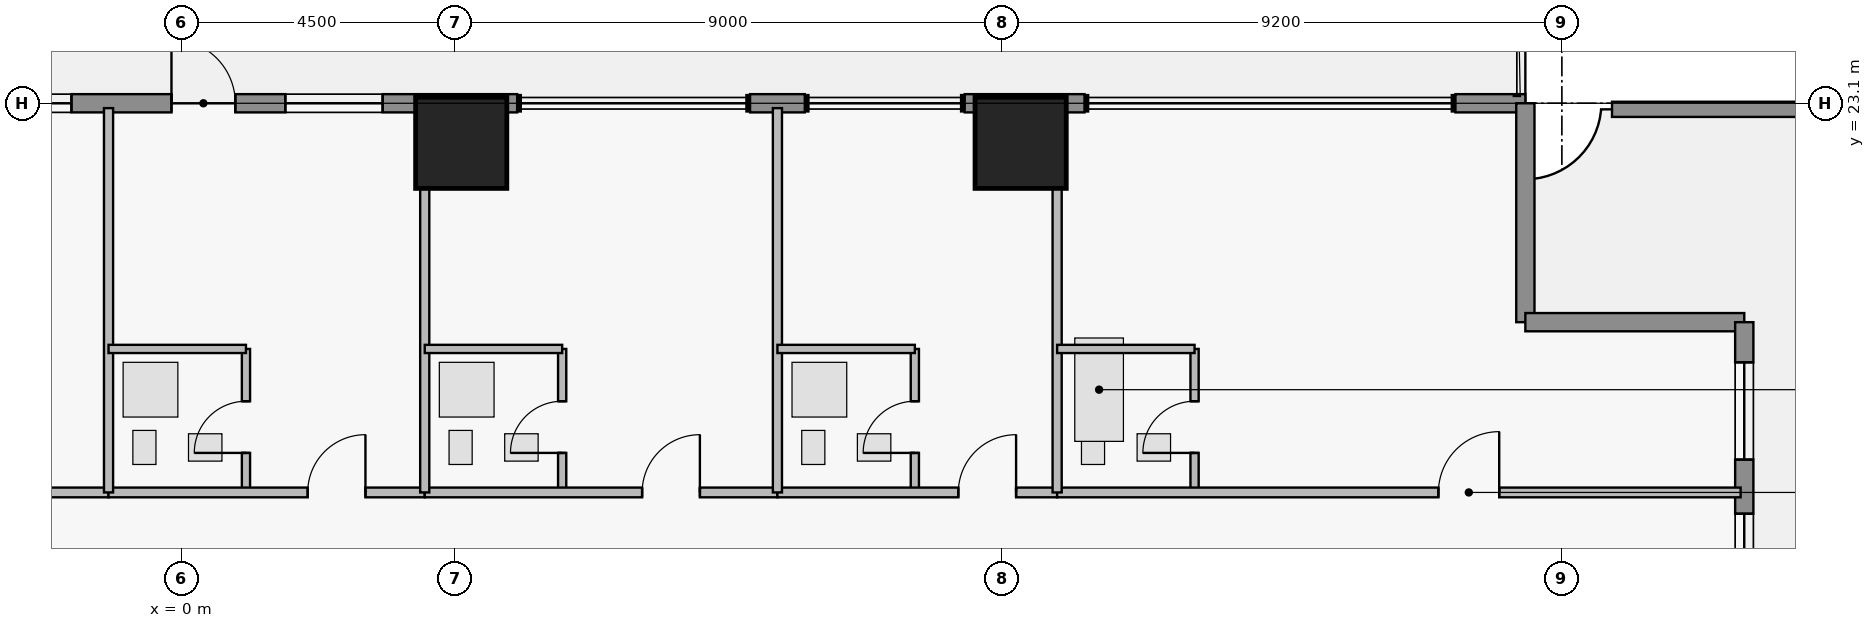
"""IFC4 building model, lengths in metres.
Left out: names, types, materials, properties, quantities, classifications, styles, units other than length and angle.
Written with IfcOpenShell. Run it as: python <this file> out.ifc"""

import sys

from ifc_helpers import new_model, si_unit, direction, frame, frame_2d, origin, origin_2d, place, context, subcontext, project, spatial, rectangle, extrude, element, fill, save


model = new_model("IFC4")
c1 = context("Model", 3, precision=1e-05, world=origin(), true_north=direction((0.0, 1.0)))
c2 = subcontext(c1, "Body", "Model", "MODEL_VIEW")
j1 = project(units=[si_unit("LENGTHUNIT", "METRE"), si_unit("PLANEANGLEUNIT", "RADIAN")], contexts=[c1])
p1 = place(None, origin())
s1 = spatial("IfcSite", under=j1, at=p1, CompositionType="ELEMENT")
p2 = place(p1, origin())
s2 = spatial("IfcBuilding", under=s1, at=p2, CompositionType="ELEMENT")
p3 = place(p2, frame((0.0, 0.0, 27.6)))
s3 = spatial("IfcBuildingStorey", under=s2, at=p3, CompositionType="ELEMENT", Elevation=27.6)
for number, where, z_axis, x_axis in (
    (1, (4.6, 22.45, 0.0), (0.0, 0.0, 1.0), (1.0, 0.0, 0.0)),
    (2, (13.8, 22.45, 0.0), (0.0, 0.0, 1.0), (1.0, 0.0, 0.0)),
):
    element("IfcColumn", number, at=place(p3, frame(where, z_axis=z_axis, x_axis=x_axis)), inside=s3, PredefinedType="COLUMN", context=c2, shape_type="SweptSolid", body=[
        extrude(rectangle(XDim=1.5, YDim=1.5, at=origin_2d()), origin(), (0.0, 0.0, 1.0), 3.65),
    ])
p4 = place(p3, frame((23.525, 23.0, 0.0), z_axis=(0.0, 0.0, 1.0), x_axis=(1.0, 0.0, 0.0)))
e3 = element("IfcWall", 3, at=p4, inside=s3, PredefinedType="PARAPET", context=c2, shape_type="SweptSolid", body=[
    extrude(rectangle(XDim=8.295, YDim=0.25, at=frame_2d((4.147, 0.0))), origin(), (0.0, 0.0, 1.0), 1.15),
])
p5 = place(p3, frame((-14.72, 23.1, 0.0), z_axis=(0.0, 0.0, 1.0), x_axis=(1.0, 0.0, 0.0)))
e4 = element("IfcWall", 4, at=p5, inside=s3, PredefinedType="STANDARD", context=c2, shape_type="SweptSolid", body=[
    extrude(rectangle(XDim=20.24, YDim=0.3, at=frame_2d((10.12, 0.0))), origin(), (0.0, 0.0, 1.0), 3.43),
])
p6 = place(p5, frame((14.555, 0.0, 0.0)))
e5 = element("IfcOpeningElement", 5, at=p6, cuts=e4, PredefinedType="OPENING", context=c2, shape_type="SweptSolid", body=[
    extrude(rectangle(XDim=1.05, YDim=2.2, at=frame_2d((0.525, 1.1))), frame((0.0, 0.16, 0.0), z_axis=(0.0, -1.0, 0.0), x_axis=(1.0, 0.0, 0.0)), (0.0, 0.0, 1.0), 0.32),
])
p7 = place(p5, frame((4.668, 0.0, 0.85)))
e6 = element("IfcOpeningElement", 6, at=p7, cuts=e4, PredefinedType="OPENING", context=c2, shape_type="SweptSolid", body=[
    extrude(rectangle(XDim=1.6, YDim=1.8, at=frame_2d((0.8, 0.9))), frame((0.0, 0.16, 0.0), z_axis=(0.0, -1.0, 0.0), x_axis=(1.0, 0.0, 0.0)), (0.0, 0.0, 1.0), 0.32),
])
p8 = place(p5, frame((2.754, 0.0, 0.95)))
e7 = element("IfcOpeningElement", 7, at=p8, cuts=e4, PredefinedType="OPENING", context=c2, shape_type="SweptSolid", body=[
    extrude(rectangle(XDim=1.15, YDim=1.55, at=frame_2d((0.575, 0.775))), frame((0.0, 0.16, 0.0), z_axis=(0.0, -1.0, 0.0), x_axis=(1.0, 0.0, 0.0)), (0.0, 0.0, 1.0), 0.32),
])
p9 = place(p5, frame((7.955, 0.0, 0.95)))
e8 = element("IfcOpeningElement", 8, at=p9, cuts=e4, PredefinedType="OPENING", context=c2, shape_type="SweptSolid", body=[
    extrude(rectangle(XDim=1.15, YDim=1.55, at=frame_2d((0.575, 0.775))), frame((0.0, 0.16, 0.0), z_axis=(0.0, -1.0, 0.0), x_axis=(1.0, 0.0, 0.0)), (0.0, 0.0, 1.0), 0.32),
])
p10 = place(p5, frame((11.31, 0.0, 0.85)))
e9 = element("IfcOpeningElement", 9, at=p10, cuts=e4, PredefinedType="OPENING", context=c2, shape_type="SweptSolid", body=[
    extrude(rectangle(XDim=1.6, YDim=1.8, at=frame_2d((0.8, 0.9))), frame((0.0, 0.16, 0.0), z_axis=(0.0, -1.0, 0.0), x_axis=(1.0, 0.0, 0.0)), (0.0, 0.0, 1.0), 0.32),
])
p11 = place(p5, frame((16.427, 0.0, 0.85)))
e10 = element("IfcOpeningElement", 10, at=p11, cuts=e4, PredefinedType="OPENING", context=c2, shape_type="SweptSolid", body=[
    extrude(rectangle(XDim=1.6, YDim=1.8, at=frame_2d((0.8, 0.9))), frame((0.0, 0.16, 0.0), z_axis=(0.0, -1.0, 0.0), x_axis=(1.0, 0.0, 0.0)), (0.0, 0.0, 1.0), 0.32),
])
p12 = place(p3, frame((9.35, 23.1, 0.0), z_axis=(0.0, 0.0, 1.0), x_axis=(1.0, 0.0, 0.0)))
e11 = element("IfcWall", 11, at=p12, inside=s3, PredefinedType="STANDARD", context=c2, shape_type="SweptSolid", body=[
    extrude(rectangle(XDim=0.9, YDim=0.3, at=frame_2d((0.45, 0.0))), origin(), (0.0, 0.0, 1.0), 3.43),
])
p13 = place(p3, frame((12.88, 23.1, 0.0), z_axis=(0.0, 0.0, 1.0), x_axis=(1.0, 0.0, 0.0)))
e12 = element("IfcWall", 12, at=p13, inside=s3, PredefinedType="STANDARD", context=c2, shape_type="SweptSolid", body=[
    extrude(rectangle(XDim=1.97, YDim=0.3, at=frame_2d((0.985, 0.0))), origin(), (0.0, 0.0, 1.0), 3.43),
])
p14 = place(p3, frame((20.95, 23.1, 0.0), z_axis=(0.0, 0.0, 1.0), x_axis=(1.0, 0.0, 0.0)))
e13 = element("IfcWall", 13, at=p14, inside=s3, PredefinedType="STANDARD", context=c2, shape_type="SweptSolid", body=[
    extrude(rectangle(XDim=1.15, YDim=0.3, at=frame_2d((0.575, 0.0))), origin(), (0.0, 0.0, 1.0), 3.43),
])
p15 = place(p3, frame((22.1, 23.1, 0.0), z_axis=(0.0, 0.0, 1.0), x_axis=(0.0, -1.0, 0.0)))
e14 = element("IfcWall", 14, at=p15, inside=s3, PredefinedType="STANDARD", context=c2, shape_type="SweptSolid", body=[
    extrude(rectangle(XDim=3.6, YDim=0.3, at=frame_2d((1.8, 0.0))), origin(), (0.0, 0.0, 1.0), 3.43),
])
p16 = place(p3, frame((22.1, 19.5, 0.0), z_axis=(0.0, 0.0, 1.0), x_axis=(1.0, 0.0, 0.0)))
e15 = element("IfcWall", 15, at=p16, inside=s3, PredefinedType="STANDARD", context=c2, shape_type="SweptSolid", body=[
    extrude(rectangle(XDim=3.6, YDim=0.3, at=frame_2d((1.8, 0.0))), origin(), (0.0, 0.0, 1.0), 3.43),
])
p17 = place(p3, frame((25.7, 19.5, 0.0), z_axis=(0.0, 0.0, 1.0), x_axis=(0.0, -1.0, 0.0)))
e16 = element("IfcWall", 16, at=p17, inside=s3, PredefinedType="STANDARD", context=c2, shape_type="SweptSolid", body=[
    extrude(rectangle(XDim=5.1, YDim=0.3, at=frame_2d((2.55, 0.0))), origin(), (0.0, 0.0, 1.0), 3.43),
])
p18 = place(p17, frame((0.66, 0.0, 0.85)))
e17 = element("IfcOpeningElement", 17, at=p18, cuts=e16, PredefinedType="OPENING", context=c2, shape_type="SweptSolid", body=[
    extrude(rectangle(XDim=1.6, YDim=1.8, at=frame_2d((0.8, 0.9))), frame((0.0, 0.16, 0.0), z_axis=(0.0, -1.0, 0.0), x_axis=(1.0, 0.0, 0.0)), (0.0, 0.0, 1.0), 0.32),
])
p19 = place(p17, frame((3.15, 0.0, 0.95)))
e18 = element("IfcOpeningElement", 18, at=p19, cuts=e16, PredefinedType="OPENING", context=c2, shape_type="SweptSolid", body=[
    extrude(rectangle(XDim=1.15, YDim=1.55, at=frame_2d((0.575, 0.775))), frame((0.0, 0.16, 0.0), z_axis=(0.0, -1.0, 0.0), x_axis=(1.0, 0.0, 0.0)), (0.0, 0.0, 1.0), 0.32),
])
p20 = place(p3, frame((-7.2, 16.7, 0.0), z_axis=(0.0, 0.0, 1.0), x_axis=(1.0, 0.0, 0.0)))
e19 = element("IfcWall", 19, at=p20, inside=s3, PredefinedType="PARTITIONING", context=c2, shape_type="SweptSolid", body=[
    extrude(rectangle(XDim=6.0, YDim=0.16, at=frame_2d((3.0, 0.0))), origin(), (0.0, 0.0, 1.0), 2.973),
])
p21 = place(p20, frame((3.675, 0.0, 0.0)))
e20 = element("IfcOpeningElement", 20, at=p21, cuts=e19, PredefinedType="OPENING", context=c2, shape_type="SweptSolid", body=[
    extrude(rectangle(XDim=0.95, YDim=2.15, at=frame_2d((0.475, 1.075))), frame((0.0, 0.09, 0.0), z_axis=(0.0, -1.0, 0.0), x_axis=(1.0, 0.0, 0.0)), (0.0, 0.0, 1.0), 0.18),
])
p22 = place(p3, frame((1.06, 16.7, 0.0), z_axis=(0.0, 0.0, 1.0), x_axis=(0.0, 1.0, 0.0)))
e21 = element("IfcWall", 21, at=p22, inside=s3, PredefinedType="PLUMBINGWALL", context=c2, shape_type="SweptSolid", body=[
    extrude(rectangle(XDim=2.36, YDim=0.135, at=frame_2d((1.18, 0.0))), origin(), (0.0, 0.0, 1.0), 3.43),
])
p23 = place(p22, frame((0.65, 0.0, 0.0)))
e22 = element("IfcOpeningElement", 22, at=p23, cuts=e21, PredefinedType="OPENING", context=c2, shape_type="SweptSolid", body=[
    extrude(rectangle(XDim=0.85, YDim=2.1, at=frame_2d((0.425, 1.05))), frame((0.0, 0.077, 0.0), z_axis=(0.0, -1.0, 0.0), x_axis=(1.0, 0.0, 0.0)), (0.0, 0.0, 1.0), 0.155),
])
p24 = place(p3, frame((-1.2, 16.7, 0.0), z_axis=(0.0, 0.0, 1.0), x_axis=(1.0, 0.0, 0.0)))
e23 = element("IfcWall", 23, at=p24, inside=s3, PredefinedType="PARTITIONING", context=c2, shape_type="SweptSolid", body=[
    extrude(rectangle(XDim=5.2, YDim=0.16, at=frame_2d((2.6, 0.0))), origin(), (0.0, 0.0, 1.0), 2.973),
])
p25 = place(p24, frame((3.275, 0.0, 0.0)))
e24 = element("IfcOpeningElement", 24, at=p25, cuts=e23, PredefinedType="OPENING", context=c2, shape_type="SweptSolid", body=[
    extrude(rectangle(XDim=0.95, YDim=2.15, at=frame_2d((0.475, 1.075))), frame((0.0, 0.09, 0.0), z_axis=(0.0, -1.0, 0.0), x_axis=(1.0, 0.0, 0.0)), (0.0, 0.0, 1.0), 0.18),
])
p26 = place(p3, frame((6.26, 16.7, 0.0), z_axis=(0.0, 0.0, 1.0), x_axis=(0.0, 1.0, 0.0)))
e25 = element("IfcWall", 25, at=p26, inside=s3, PredefinedType="PLUMBINGWALL", context=c2, shape_type="SweptSolid", body=[
    extrude(rectangle(XDim=2.36, YDim=0.135, at=frame_2d((1.18, 0.0))), origin(), (0.0, 0.0, 1.0), 3.43),
])
p27 = place(p26, frame((0.65, 0.0, 0.0)))
e26 = element("IfcOpeningElement", 26, at=p27, cuts=e25, PredefinedType="OPENING", context=c2, shape_type="SweptSolid", body=[
    extrude(rectangle(XDim=0.85, YDim=2.1, at=frame_2d((0.425, 1.05))), frame((0.0, 0.077, 0.0), z_axis=(0.0, -1.0, 0.0), x_axis=(1.0, 0.0, 0.0)), (0.0, 0.0, 1.0), 0.155),
])
p28 = place(p3, frame((4.0, 16.7, 0.0), z_axis=(0.0, 0.0, 1.0), x_axis=(1.0, 0.0, 0.0)))
e27 = element("IfcWall", 27, at=p28, inside=s3, PredefinedType="PARTITIONING", context=c2, shape_type="SweptSolid", body=[
    extrude(rectangle(XDim=5.8, YDim=0.16, at=frame_2d((2.9, 0.0))), origin(), (0.0, 0.0, 1.0), 2.973),
])
p29 = place(p28, frame((3.575, 0.0, 0.0)))
e28 = element("IfcOpeningElement", 28, at=p29, cuts=e27, PredefinedType="OPENING", context=c2, shape_type="SweptSolid", body=[
    extrude(rectangle(XDim=0.95, YDim=2.15, at=frame_2d((0.475, 1.075))), frame((0.0, 0.09, 0.0), z_axis=(0.0, -1.0, 0.0), x_axis=(1.0, 0.0, 0.0)), (0.0, 0.0, 1.0), 0.18),
])
p30 = place(p3, frame((12.06, 16.7, 0.0), z_axis=(0.0, 0.0, 1.0), x_axis=(0.0, 1.0, 0.0)))
e29 = element("IfcWall", 29, at=p30, inside=s3, PredefinedType="PLUMBINGWALL", context=c2, shape_type="SweptSolid", body=[
    extrude(rectangle(XDim=2.36, YDim=0.135, at=frame_2d((1.18, 0.0))), origin(), (0.0, 0.0, 1.0), 3.43),
])
p31 = place(p30, frame((0.65, 0.0, 0.0)))
e30 = element("IfcOpeningElement", 30, at=p31, cuts=e29, PredefinedType="OPENING", context=c2, shape_type="SweptSolid", body=[
    extrude(rectangle(XDim=0.85, YDim=2.1, at=frame_2d((0.425, 1.05))), frame((0.0, 0.077, 0.0), z_axis=(0.0, -1.0, 0.0), x_axis=(1.0, 0.0, 0.0)), (0.0, 0.0, 1.0), 0.155),
])
p32 = place(p3, frame((9.8, 16.7, 0.0), z_axis=(0.0, 0.0, 1.0), x_axis=(1.0, 0.0, 0.0)))
e31 = element("IfcWall", 31, at=p32, inside=s3, PredefinedType="PARTITIONING", context=c2, shape_type="SweptSolid", body=[
    extrude(rectangle(XDim=4.6, YDim=0.16, at=frame_2d((2.3, 0.0))), origin(), (0.0, 0.0, 1.0), 2.973),
])
p33 = place(p32, frame((2.975, 0.0, 0.0)))
e32 = element("IfcOpeningElement", 32, at=p33, cuts=e31, PredefinedType="OPENING", context=c2, shape_type="SweptSolid", body=[
    extrude(rectangle(XDim=0.95, YDim=2.15, at=frame_2d((0.475, 1.075))), frame((0.0, 0.09, 0.0), z_axis=(0.0, -1.0, 0.0), x_axis=(1.0, 0.0, 0.0)), (0.0, 0.0, 1.0), 0.18),
])
p34 = place(p3, frame((16.66, 16.7, 0.0), z_axis=(0.0, 0.0, 1.0), x_axis=(0.0, 1.0, 0.0)))
e33 = element("IfcWall", 33, at=p34, inside=s3, PredefinedType="PLUMBINGWALL", context=c2, shape_type="SweptSolid", body=[
    extrude(rectangle(XDim=2.36, YDim=0.135, at=frame_2d((1.18, 0.0))), origin(), (0.0, 0.0, 1.0), 3.43),
])
p35 = place(p34, frame((0.65, 0.0, 0.0)))
e34 = element("IfcOpeningElement", 34, at=p35, cuts=e33, PredefinedType="OPENING", context=c2, shape_type="SweptSolid", body=[
    extrude(rectangle(XDim=0.85, YDim=2.1, at=frame_2d((0.425, 1.05))), frame((0.0, 0.077, 0.0), z_axis=(0.0, -1.0, 0.0), x_axis=(1.0, 0.0, 0.0)), (0.0, 0.0, 1.0), 0.155),
])
p36 = place(p3, frame((14.4, 16.7, 0.0), z_axis=(0.0, 0.0, 1.0), x_axis=(1.0, 0.0, 0.0)))
e35 = element("IfcWall", 35, at=p36, inside=s3, PredefinedType="PARTITIONING", context=c2, shape_type="SweptSolid", body=[
    extrude(rectangle(XDim=11.24, YDim=0.16, at=frame_2d((5.62, 0.0))), origin(), (0.0, 0.0, 1.0), 3.43),
])
p37 = place(p36, frame((6.27, 0.0, 0.0)))
e36 = element("IfcOpeningElement", 36, at=p37, cuts=e35, PredefinedType="OPENING", context=c2, shape_type="SweptSolid", body=[
    extrude(rectangle(XDim=1.0, YDim=2.15, at=frame_2d((0.5, 1.075))), frame((0.0, 0.09, 0.0), z_axis=(0.0, -1.0, 0.0), x_axis=(1.0, 0.0, 0.0)), (0.0, 0.0, 1.0), 0.18),
])
p38 = place(p3, frame((-1.2, 16.7, 0.0), z_axis=(0.0, 0.0, 1.0), x_axis=(0.0, 1.0, 0.0)))
e37 = element("IfcWall", 37, at=p38, inside=s3, PredefinedType="PARTITIONING", context=c2, shape_type="SweptSolid", body=[
    extrude(rectangle(XDim=6.32, YDim=0.15, at=frame_2d((3.16, 0.0))), origin(), (0.0, 0.0, 1.0), 3.43),
])
p39 = place(p3, frame((-1.2, 19.06, 0.0), z_axis=(0.0, 0.0, 1.0), x_axis=(1.0, 0.0, 0.0)))
e38 = element("IfcWall", 38, at=p39, inside=s3, PredefinedType="PLUMBINGWALL", context=c2, shape_type="SweptSolid", body=[
    extrude(rectangle(XDim=2.26, YDim=0.135, at=frame_2d((1.13, 0.0))), origin(), (0.0, 0.0, 1.0), 2.973),
])
p40 = place(p3, frame((4.0, 16.7, 0.0), z_axis=(0.0, 0.0, 1.0), x_axis=(0.0, 1.0, 0.0)))
e39 = element("IfcWall", 39, at=p40, inside=s3, PredefinedType="PARTITIONING", context=c2, shape_type="SweptSolid", body=[
    extrude(rectangle(XDim=6.32, YDim=0.15, at=frame_2d((3.16, 0.0))), origin(), (0.0, 0.0, 1.0), 3.43),
])
p41 = place(p3, frame((4.0, 19.06, 0.0), z_axis=(0.0, 0.0, 1.0), x_axis=(1.0, 0.0, 0.0)))
e40 = element("IfcWall", 40, at=p41, inside=s3, PredefinedType="PLUMBINGWALL", context=c2, shape_type="SweptSolid", body=[
    extrude(rectangle(XDim=2.26, YDim=0.135, at=frame_2d((1.13, 0.0))), origin(), (0.0, 0.0, 1.0), 2.973),
])
p42 = place(p3, frame((9.8, 16.7, 0.0), z_axis=(0.0, 0.0, 1.0), x_axis=(0.0, 1.0, 0.0)))
e41 = element("IfcWall", 41, at=p42, inside=s3, PredefinedType="PARTITIONING", context=c2, shape_type="SweptSolid", body=[
    extrude(rectangle(XDim=6.32, YDim=0.15, at=frame_2d((3.16, 0.0))), origin(), (0.0, 0.0, 1.0), 3.43),
])
p43 = place(p3, frame((9.8, 19.06, 0.0), z_axis=(0.0, 0.0, 1.0), x_axis=(1.0, 0.0, 0.0)))
e42 = element("IfcWall", 42, at=p43, inside=s3, PredefinedType="PLUMBINGWALL", context=c2, shape_type="SweptSolid", body=[
    extrude(rectangle(XDim=2.26, YDim=0.135, at=frame_2d((1.13, 0.0))), origin(), (0.0, 0.0, 1.0), 2.973),
])
p44 = place(p3, frame((14.4, 16.7, 0.0), z_axis=(0.0, 0.0, 1.0), x_axis=(0.0, 1.0, 0.0)))
e43 = element("IfcWall", 43, at=p44, inside=s3, PredefinedType="PARTITIONING", context=c2, shape_type="SweptSolid", body=[
    extrude(rectangle(XDim=6.32, YDim=0.15, at=frame_2d((3.16, 0.0))), origin(), (0.0, 0.0, 1.0), 3.43),
])
p45 = place(p3, frame((14.4, 19.06, 0.0), z_axis=(0.0, 0.0, 1.0), x_axis=(1.0, 0.0, 0.0)))
e44 = element("IfcWall", 44, at=p45, inside=s3, PredefinedType="PLUMBINGWALL", context=c2, shape_type="SweptSolid", body=[
    extrude(rectangle(XDim=2.26, YDim=0.135, at=frame_2d((1.13, 0.0))), origin(), (0.0, 0.0, 1.0), 3.43),
])
p46 = place(p6, origin())
e45 = element("IfcDoor", 45, at=p46, inside=s3, OperationType="SINGLE_SWING_LEFT", PredefinedType="DOOR", context=c2, shape_type="SweptSolid", body=[
    extrude(rectangle(XDim=1.05, YDim=2.2, at=frame_2d((0.525, 1.1))), frame((0.0, 0.025, 0.0), z_axis=(0.0, -1.0, 0.0), x_axis=(1.0, 0.0, 0.0)), (0.0, 0.0, 1.0), 0.05),
])
fill(e5, e45)
p47 = place(p10, origin())
e46 = element("IfcWindow", 46, at=p47, inside=s3, PartitioningType="SINGLE_PANEL", PredefinedType="WINDOW", context=c2, shape_type="SweptSolid", body=[
    extrude(rectangle(XDim=1.6, YDim=1.8, at=frame_2d((0.8, 0.9))), frame((0.0, 0.03, 0.0), z_axis=(0.0, -1.0, 0.0), x_axis=(1.0, 0.0, 0.0)), (0.0, 0.0, 1.0), 0.06),
])
fill(e9, e46)
p48 = place(p11, origin())
e47 = element("IfcWindow", 47, at=p48, inside=s3, PartitioningType="SINGLE_PANEL", PredefinedType="WINDOW", context=c2, shape_type="SweptSolid", body=[
    extrude(rectangle(XDim=1.6, YDim=1.8, at=frame_2d((0.8, 0.9))), frame((0.0, 0.03, 0.0), z_axis=(0.0, -1.0, 0.0), x_axis=(1.0, 0.0, 0.0)), (0.0, 0.0, 1.0), 0.06),
])
fill(e10, e47)
p49 = place(p18, origin())
e48 = element("IfcWindow", 48, at=p49, inside=s3, PartitioningType="SINGLE_PANEL", PredefinedType="WINDOW", context=c2, shape_type="SweptSolid", body=[
    extrude(rectangle(XDim=1.6, YDim=1.8, at=frame_2d((0.8, 0.9))), frame((0.0, 0.03, 0.0), z_axis=(0.0, -1.0, 0.0), x_axis=(1.0, 0.0, 0.0)), (0.0, 0.0, 1.0), 0.06),
])
fill(e17, e48)
p50 = place(p19, origin())
e49 = element("IfcWindow", 49, at=p50, inside=s3, PartitioningType="SINGLE_PANEL", PredefinedType="WINDOW", context=c2, shape_type="SweptSolid", body=[
    extrude(rectangle(XDim=1.15, YDim=1.55, at=frame_2d((0.575, 0.775))), frame((0.0, 0.03, 0.0), z_axis=(0.0, -1.0, 0.0), x_axis=(1.0, 0.0, 0.0)), (0.0, 0.0, 1.0), 0.06),
])
fill(e18, e49)
p51 = place(p23, origin())
e50 = element("IfcDoor", 50, at=p51, inside=s3, OperationType="SINGLE_SWING_LEFT", PredefinedType="DOOR", context=c2, shape_type="SweptSolid", body=[
    extrude(rectangle(XDim=0.85, YDim=2.1, at=frame_2d((0.425, 1.05))), frame((0.0, 0.025, 0.0), z_axis=(0.0, -1.0, 0.0), x_axis=(1.0, 0.0, 0.0)), (0.0, 0.0, 1.0), 0.05),
])
fill(e22, e50)
p52 = place(p25, origin())
e51 = element("IfcDoor", 51, at=p52, inside=s3, OperationType="SINGLE_SWING_RIGHT", PredefinedType="DOOR", context=c2, shape_type="SweptSolid", body=[
    extrude(rectangle(XDim=0.95, YDim=2.15, at=frame_2d((0.475, 1.075))), frame((0.0, 0.025, 0.0), z_axis=(0.0, -1.0, 0.0), x_axis=(1.0, 0.0, 0.0)), (0.0, 0.0, 1.0), 0.05),
])
fill(e24, e51)
p53 = place(p27, origin())
e52 = element("IfcDoor", 52, at=p53, inside=s3, OperationType="SINGLE_SWING_LEFT", PredefinedType="DOOR", context=c2, shape_type="SweptSolid", body=[
    extrude(rectangle(XDim=0.85, YDim=2.1, at=frame_2d((0.425, 1.05))), frame((0.0, 0.025, 0.0), z_axis=(0.0, -1.0, 0.0), x_axis=(1.0, 0.0, 0.0)), (0.0, 0.0, 1.0), 0.05),
])
fill(e26, e52)
p54 = place(p29, origin())
e53 = element("IfcDoor", 53, at=p54, inside=s3, OperationType="SINGLE_SWING_RIGHT", PredefinedType="DOOR", context=c2, shape_type="SweptSolid", body=[
    extrude(rectangle(XDim=0.95, YDim=2.15, at=frame_2d((0.475, 1.075))), frame((0.0, 0.025, 0.0), z_axis=(0.0, -1.0, 0.0), x_axis=(1.0, 0.0, 0.0)), (0.0, 0.0, 1.0), 0.05),
])
fill(e28, e53)
p55 = place(p31, origin())
e54 = element("IfcDoor", 54, at=p55, inside=s3, OperationType="SINGLE_SWING_LEFT", PredefinedType="DOOR", context=c2, shape_type="SweptSolid", body=[
    extrude(rectangle(XDim=0.85, YDim=2.1, at=frame_2d((0.425, 1.05))), frame((0.0, 0.025, 0.0), z_axis=(0.0, -1.0, 0.0), x_axis=(1.0, 0.0, 0.0)), (0.0, 0.0, 1.0), 0.05),
])
fill(e30, e54)
p56 = place(p33, origin())
e55 = element("IfcDoor", 55, at=p56, inside=s3, OperationType="SINGLE_SWING_RIGHT", PredefinedType="DOOR", context=c2, shape_type="SweptSolid", body=[
    extrude(rectangle(XDim=0.95, YDim=2.15, at=frame_2d((0.475, 1.075))), frame((0.0, 0.025, 0.0), z_axis=(0.0, -1.0, 0.0), x_axis=(1.0, 0.0, 0.0)), (0.0, 0.0, 1.0), 0.05),
])
fill(e32, e55)
p57 = place(p35, origin())
e56 = element("IfcDoor", 56, at=p57, inside=s3, OperationType="SINGLE_SWING_LEFT", PredefinedType="DOOR", context=c2, shape_type="SweptSolid", body=[
    extrude(rectangle(XDim=0.85, YDim=2.1, at=frame_2d((0.425, 1.05))), frame((0.0, 0.025, 0.0), z_axis=(0.0, -1.0, 0.0), x_axis=(1.0, 0.0, 0.0)), (0.0, 0.0, 1.0), 0.05),
])
fill(e34, e56)
p58 = place(p37, origin())
e57 = element("IfcDoor", 57, at=p58, inside=s3, OperationType="SINGLE_SWING_RIGHT", PredefinedType="DOOR", context=c2, shape_type="SweptSolid", body=[
    extrude(rectangle(XDim=1.0, YDim=2.15, at=frame_2d((0.5, 1.075))), frame((0.0, 0.025, 0.0), z_axis=(0.0, -1.0, 0.0), x_axis=(1.0, 0.0, 0.0)), (0.0, 0.0, 1.0), 0.05),
])
fill(e36, e57)
save(model, sys.argv[1])
